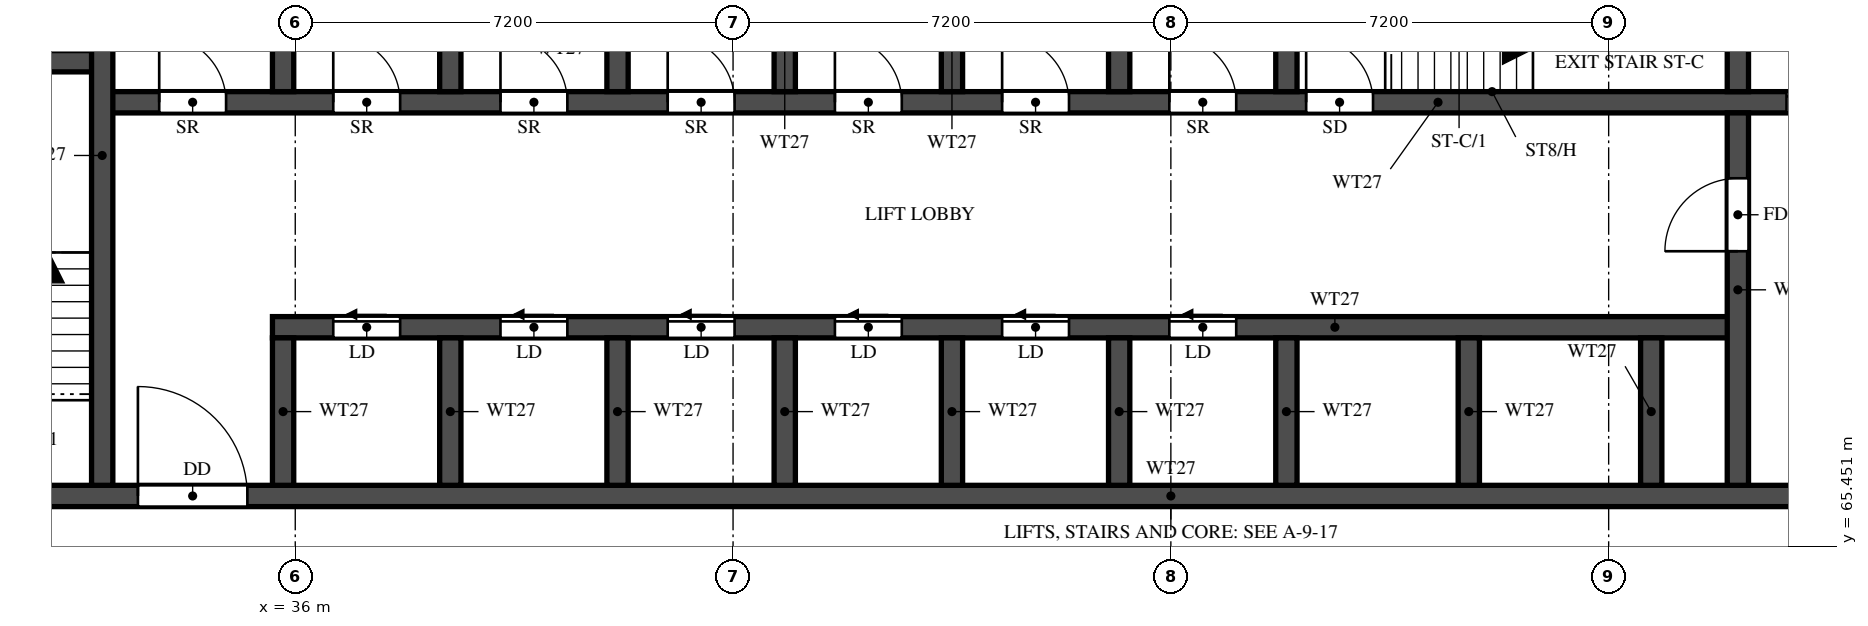
"""IFC4 building model, lengths in metres.
Left out: names, types, materials, properties, quantities, classifications, styles, units other than length and angle.
Written with IfcOpenShell. Run it as: python <this file> out.ifc"""

import sys

from ifc_helpers import new_model, si_unit, direction, frame, frame_2d, origin, place, context, subcontext, project, spatial, rectangle, extrude, element, fill, save


model = new_model("IFC4")
c1 = context("Model", 3, precision=1e-05, world=origin(), true_north=direction((0.0, 1.0)))
c2 = subcontext(c1, "Body", "Model", "MODEL_VIEW")
j1 = project(units=[si_unit("LENGTHUNIT", "METRE"), si_unit("PLANEANGLEUNIT", "RADIAN")], contexts=[c1])
p1 = place(None, origin())
s1 = spatial("IfcSite", under=j1, at=p1, CompositionType="ELEMENT")
p2 = place(p1, origin())
s2 = spatial("IfcBuilding", under=s1, at=p2, CompositionType="ELEMENT")
p3 = place(p2, frame((0.0, 0.0, 116.5)))
s3 = spatial("IfcBuildingStorey", under=s2, at=p3, CompositionType="ELEMENT", Elevation=116.5)
p4 = place(p3, frame((29.7, 66.275, 0.0), z_axis=(0.0, 0.0, 1.0), x_axis=(1.0, 0.0, 0.0)))
e1 = element("IfcWall", 1, at=p4, inside=s3, PredefinedType="SHEAR", context=c2, shape_type="SweptSolid", body=[
    extrude(rectangle(XDim=41.4, YDim=0.35, at=frame_2d((20.7, 0.0))), origin(), (0.0, 0.0, 1.0), 3.2),
])
p5 = place(p4, frame((0.925, 0.0, 0.0)))
e2 = element("IfcOpeningElement", 2, at=p5, cuts=e1, PredefinedType="OPENING", context=c2, shape_type="SweptSolid", body=[
    extrude(rectangle(XDim=1.1, YDim=2.1, at=frame_2d((0.55, 1.05))), frame((0.0, 0.185, 0.0), z_axis=(0.0, -1.0, 0.0), x_axis=(1.0, 0.0, 0.0)), (0.0, 0.0, 1.0), 0.37),
])
p6 = place(p4, frame((3.712, 0.0, 0.0)))
e3 = element("IfcOpeningElement", 3, at=p6, cuts=e1, PredefinedType="OPENING", context=c2, shape_type="SweptSolid", body=[
    extrude(rectangle(XDim=1.8, YDim=2.1, at=frame_2d((0.9, 1.05))), frame((0.0, 0.185, 0.0), z_axis=(0.0, -1.0, 0.0), x_axis=(1.0, 0.0, 0.0)), (0.0, 0.0, 1.0), 0.37),
])
p7 = place(p3, frame((35.625, 69.05, 0.0), z_axis=(0.0, 0.0, 1.0), x_axis=(1.0, 0.0, 0.0)))
e4 = element("IfcWall", 4, at=p7, inside=s3, PredefinedType="SHEAR", context=c2, shape_type="SweptSolid", body=[
    extrude(rectangle(XDim=24.1, YDim=0.35, at=frame_2d((12.05, 0.0))), origin(), (0.0, 0.0, 1.0), 3.2),
])
p8 = place(p7, frame((1.0, 0.0, 0.0)))
e5 = element("IfcOpeningElement", 5, at=p8, cuts=e4, PredefinedType="OPENING", context=c2, shape_type="SweptSolid", body=[
    extrude(rectangle(XDim=1.1, YDim=2.1, at=frame_2d((0.55, 1.05))), frame((0.0, 0.185, 0.0), z_axis=(0.0, -1.0, 0.0), x_axis=(1.0, 0.0, 0.0)), (0.0, 0.0, 1.0), 0.37),
])
p9 = place(p7, frame((3.75, 0.0, 0.0)))
e6 = element("IfcOpeningElement", 6, at=p9, cuts=e4, PredefinedType="OPENING", context=c2, shape_type="SweptSolid", body=[
    extrude(rectangle(XDim=1.1, YDim=2.1, at=frame_2d((0.55, 1.05))), frame((0.0, 0.185, 0.0), z_axis=(0.0, -1.0, 0.0), x_axis=(1.0, 0.0, 0.0)), (0.0, 0.0, 1.0), 0.37),
])
p10 = place(p7, frame((6.5, 0.0, 0.0)))
e7 = element("IfcOpeningElement", 7, at=p10, cuts=e4, PredefinedType="OPENING", context=c2, shape_type="SweptSolid", body=[
    extrude(rectangle(XDim=1.1, YDim=2.1, at=frame_2d((0.55, 1.05))), frame((0.0, 0.185, 0.0), z_axis=(0.0, -1.0, 0.0), x_axis=(1.0, 0.0, 0.0)), (0.0, 0.0, 1.0), 0.37),
])
p11 = place(p7, frame((9.25, 0.0, 0.0)))
e8 = element("IfcOpeningElement", 8, at=p11, cuts=e4, PredefinedType="OPENING", context=c2, shape_type="SweptSolid", body=[
    extrude(rectangle(XDim=1.1, YDim=2.1, at=frame_2d((0.55, 1.05))), frame((0.0, 0.185, 0.0), z_axis=(0.0, -1.0, 0.0), x_axis=(1.0, 0.0, 0.0)), (0.0, 0.0, 1.0), 0.37),
])
p12 = place(p7, frame((12.0, 0.0, 0.0)))
e9 = element("IfcOpeningElement", 9, at=p12, cuts=e4, PredefinedType="OPENING", context=c2, shape_type="SweptSolid", body=[
    extrude(rectangle(XDim=1.1, YDim=2.1, at=frame_2d((0.55, 1.05))), frame((0.0, 0.185, 0.0), z_axis=(0.0, -1.0, 0.0), x_axis=(1.0, 0.0, 0.0)), (0.0, 0.0, 1.0), 0.37),
])
p13 = place(p7, frame((14.75, 0.0, 0.0)))
e10 = element("IfcOpeningElement", 10, at=p13, cuts=e4, PredefinedType="OPENING", context=c2, shape_type="SweptSolid", body=[
    extrude(rectangle(XDim=1.1, YDim=2.1, at=frame_2d((0.55, 1.05))), frame((0.0, 0.185, 0.0), z_axis=(0.0, -1.0, 0.0), x_axis=(1.0, 0.0, 0.0)), (0.0, 0.0, 1.0), 0.37),
])
p14 = place(p3, frame((32.825, 72.75, 0.0), z_axis=(0.0, 0.0, 1.0), x_axis=(1.0, 0.0, 0.0)))
e11 = element("IfcWall", 11, at=p14, inside=s3, PredefinedType="SHEAR", context=c2, shape_type="SweptSolid", body=[
    extrude(rectangle(XDim=35.15, YDim=0.35, at=frame_2d((17.575, 0.0))), origin(), (0.0, 0.0, 1.0), 3.2),
])
p15 = place(p14, frame((19.8, 0.0, 0.0)))
e12 = element("IfcOpeningElement", 12, at=p15, cuts=e11, PredefinedType="OPENING", context=c2, shape_type="SweptSolid", body=[
    extrude(rectangle(XDim=1.1, YDim=2.1, at=frame_2d((0.55, 1.05))), frame((0.0, 0.185, 0.0), z_axis=(0.0, -1.0, 0.0), x_axis=(1.0, 0.0, 0.0)), (0.0, 0.0, 1.0), 0.37),
])
p16 = place(p14, frame((27.7, 0.0, 0.0)))
e13 = element("IfcOpeningElement", 13, at=p16, cuts=e11, PredefinedType="OPENING", context=c2, shape_type="SweptSolid", body=[
    extrude(rectangle(XDim=1.1, YDim=2.1, at=frame_2d((0.55, 1.05))), frame((0.0, 0.185, 0.0), z_axis=(0.0, -1.0, 0.0), x_axis=(1.0, 0.0, 0.0)), (0.0, 0.0, 1.0), 0.37),
])
p17 = place(p14, frame((30.3, 0.0, 0.0)))
e14 = element("IfcOpeningElement", 14, at=p17, cuts=e11, PredefinedType="OPENING", context=c2, shape_type="SweptSolid", body=[
    extrude(rectangle(XDim=1.1, YDim=2.1, at=frame_2d((0.55, 1.05))), frame((0.0, 0.185, 0.0), z_axis=(0.0, -1.0, 0.0), x_axis=(1.0, 0.0, 0.0)), (0.0, 0.0, 1.0), 0.37),
])
p18 = place(p14, frame((3.8, 0.0, 0.0)))
e15 = element("IfcOpeningElement", 15, at=p18, cuts=e11, PredefinedType="OPENING", context=c2, shape_type="SweptSolid", body=[
    extrude(rectangle(XDim=1.1, YDim=2.1, at=frame_2d((0.55, 1.05))), frame((0.0, 0.185, 0.0), z_axis=(0.0, -1.0, 0.0), x_axis=(1.0, 0.0, 0.0)), (0.0, 0.0, 1.0), 0.37),
])
p19 = place(p14, frame((6.55, 0.0, 0.0)))
e16 = element("IfcOpeningElement", 16, at=p19, cuts=e11, PredefinedType="OPENING", context=c2, shape_type="SweptSolid", body=[
    extrude(rectangle(XDim=1.1, YDim=2.1, at=frame_2d((0.55, 1.05))), frame((0.0, 0.185, 0.0), z_axis=(0.0, -1.0, 0.0), x_axis=(1.0, 0.0, 0.0)), (0.0, 0.0, 1.0), 0.37),
])
p20 = place(p14, frame((9.3, 0.0, 0.0)))
e17 = element("IfcOpeningElement", 17, at=p20, cuts=e11, PredefinedType="OPENING", context=c2, shape_type="SweptSolid", body=[
    extrude(rectangle(XDim=1.1, YDim=2.1, at=frame_2d((0.55, 1.05))), frame((0.0, 0.185, 0.0), z_axis=(0.0, -1.0, 0.0), x_axis=(1.0, 0.0, 0.0)), (0.0, 0.0, 1.0), 0.37),
])
p21 = place(p14, frame((12.05, 0.0, 0.0)))
e18 = element("IfcOpeningElement", 18, at=p21, cuts=e11, PredefinedType="OPENING", context=c2, shape_type="SweptSolid", body=[
    extrude(rectangle(XDim=1.1, YDim=2.1, at=frame_2d((0.55, 1.05))), frame((0.0, 0.185, 0.0), z_axis=(0.0, -1.0, 0.0), x_axis=(1.0, 0.0, 0.0)), (0.0, 0.0, 1.0), 0.37),
])
p22 = place(p14, frame((14.8, 0.0, 0.0)))
e19 = element("IfcOpeningElement", 19, at=p22, cuts=e11, PredefinedType="OPENING", context=c2, shape_type="SweptSolid", body=[
    extrude(rectangle(XDim=1.1, YDim=2.1, at=frame_2d((0.55, 1.05))), frame((0.0, 0.185, 0.0), z_axis=(0.0, -1.0, 0.0), x_axis=(1.0, 0.0, 0.0)), (0.0, 0.0, 1.0), 0.37),
])
p23 = place(p14, frame((17.55, 0.0, 0.0)))
e20 = element("IfcOpeningElement", 20, at=p23, cuts=e11, PredefinedType="OPENING", context=c2, shape_type="SweptSolid", body=[
    extrude(rectangle(XDim=1.1, YDim=2.1, at=frame_2d((0.55, 1.05))), frame((0.0, 0.185, 0.0), z_axis=(0.0, -1.0, 0.0), x_axis=(1.0, 0.0, 0.0)), (0.0, 0.0, 1.0), 0.37),
])
p24 = place(p14, frame((0.938, 0.0, 0.0)))
e21 = element("IfcOpeningElement", 21, at=p24, cuts=e11, PredefinedType="OPENING", context=c2, shape_type="SweptSolid", body=[
    extrude(rectangle(XDim=1.1, YDim=2.1, at=frame_2d((0.55, 1.05))), frame((0.0, 0.185, 0.0), z_axis=(0.0, -1.0, 0.0), x_axis=(1.0, 0.0, 0.0)), (0.0, 0.0, 1.0), 0.37),
])
p25 = place(p3, frame((29.7, 73.425, 0.0), z_axis=(0.0, 0.0, 1.0), x_axis=(1.0, 0.0, 0.0)))
e22 = element("IfcWall", 22, at=p25, inside=s3, PredefinedType="SHEAR", context=c2, shape_type="SweptSolid", body=[
    extrude(rectangle(XDim=3.125, YDim=0.35, at=frame_2d((1.562, 0.0))), origin(), (0.0, 0.0, 1.0), 3.2),
])
p26 = place(p3, frame((32.825, 66.45, 0.0), z_axis=(0.0, 0.0, 1.0), x_axis=(0.0, 1.0, 0.0)))
e23 = element("IfcWall", 23, at=p26, inside=s3, PredefinedType="SHEAR", context=c2, shape_type="SweptSolid", body=[
    extrude(rectangle(XDim=10.85, YDim=0.35, at=frame_2d((5.425, 0.0))), origin(), (0.0, 0.0, 1.0), 3.2),
])
p27 = place(p3, frame((59.725, 66.45, 0.0), z_axis=(0.0, 0.0, 1.0), x_axis=(0.0, 1.0, 0.0)))
e24 = element("IfcWall", 24, at=p27, inside=s3, PredefinedType="SHEAR", context=c2, shape_type="SweptSolid", body=[
    extrude(rectangle(XDim=6.125, YDim=0.35, at=frame_2d((3.062, 0.0))), origin(), (0.0, 0.0, 1.0), 3.2),
])
p28 = place(p27, frame((3.85, 0.0, 0.0)))
e25 = element("IfcOpeningElement", 25, at=p28, cuts=e24, PredefinedType="OPENING", context=c2, shape_type="SweptSolid", body=[
    extrude(rectangle(XDim=1.2, YDim=2.1, at=frame_2d((0.6, 1.05))), frame((0.0, 0.185, 0.0), z_axis=(0.0, -1.0, 0.0), x_axis=(1.0, 0.0, 0.0)), (0.0, 0.0, 1.0), 0.37),
])
p29 = place(p3, frame((59.725, 72.925, 0.0), z_axis=(0.0, 0.0, 1.0), x_axis=(0.0, 1.0, 0.0)))
e26 = element("IfcWall", 26, at=p29, inside=s3, PredefinedType="SHEAR", context=c2, shape_type="SweptSolid", body=[
    extrude(rectangle(XDim=2.95, YDim=0.35, at=frame_2d((1.475, 0.0))), origin(), (0.0, 0.0, 1.0), 3.2),
])
for number, where, z_axis, x_axis in (
    (27, (35.8, 66.45, 0.0), (0.0, 0.0, 1.0), (0.0, 1.0, 0.0)),
    (28, (38.55, 66.45, 0.0), (0.0, 0.0, 1.0), (0.0, 1.0, 0.0)),
    (29, (41.3, 66.45, 0.0), (0.0, 0.0, 1.0), (0.0, 1.0, 0.0)),
    (30, (44.05, 66.45, 0.0), (0.0, 0.0, 1.0), (0.0, 1.0, 0.0)),
    (31, (46.8, 66.45, 0.0), (0.0, 0.0, 1.0), (0.0, 1.0, 0.0)),
    (32, (49.55, 66.45, 0.0), (0.0, 0.0, 1.0), (0.0, 1.0, 0.0)),
    (33, (52.3, 66.45, 0.0), (0.0, 0.0, 1.0), (0.0, 1.0, 0.0)),
    (34, (55.3, 66.45, 0.0), (0.0, 0.0, 1.0), (0.0, 1.0, 0.0)),
    (35, (58.3, 66.45, 0.0), (0.0, 0.0, 1.0), (0.0, 1.0, 0.0)),
):
    element("IfcWall", number, at=place(p3, frame(where, z_axis=z_axis, x_axis=x_axis)), inside=s3, PredefinedType="SHEAR", context=c2, shape_type="SweptSolid", body=[
        extrude(rectangle(XDim=2.425, YDim=0.35, at=frame_2d((1.212, 0.0))), origin(), (0.0, 0.0, 1.0), 3.2),
    ])
for number, where, z_axis, x_axis in (
    (36, (35.8, 72.925, 0.0), (0.0, 0.0, 1.0), (0.0, 1.0, 0.0)),
    (37, (38.55, 72.925, 0.0), (0.0, 0.0, 1.0), (0.0, 1.0, 0.0)),
    (38, (41.3, 72.925, 0.0), (0.0, 0.0, 1.0), (0.0, 1.0, 0.0)),
    (39, (44.05, 72.925, 0.0), (0.0, 0.0, 1.0), (0.0, 1.0, 0.0)),
    (40, (46.8, 72.925, 0.0), (0.0, 0.0, 1.0), (0.0, 1.0, 0.0)),
    (41, (49.55, 72.925, 0.0), (0.0, 0.0, 1.0), (0.0, 1.0, 0.0)),
    (42, (52.3, 72.925, 0.0), (0.0, 0.0, 1.0), (0.0, 1.0, 0.0)),
):
    element("IfcWall", number, at=place(p3, frame(where, z_axis=z_axis, x_axis=x_axis)), inside=s3, PredefinedType="SHEAR", context=c2, shape_type="SweptSolid", body=[
        extrude(rectangle(XDim=2.95, YDim=0.35, at=frame_2d((1.475, 0.0))), origin(), (0.0, 0.0, 1.0), 3.2),
    ])
p30 = place(p15, origin())
e43 = element("IfcDoor", 43, at=p30, inside=s3, OperationType="SINGLE_SWING_LEFT", PredefinedType="DOOR", context=c2, shape_type="SweptSolid", body=[
    extrude(rectangle(XDim=1.1, YDim=2.1, at=frame_2d((0.55, 1.05))), frame((0.0, 0.025, 0.0), z_axis=(0.0, -1.0, 0.0), x_axis=(1.0, 0.0, 0.0)), (0.0, 0.0, 1.0), 0.05),
])
fill(e12, e43)
p31 = place(p6, origin())
e44 = element("IfcDoor", 44, at=p31, inside=s3, OperationType="DOUBLE_DOOR_SINGLE_SWING", PredefinedType="DOOR", context=c2, shape_type="SweptSolid", body=[
    extrude(rectangle(XDim=1.8, YDim=2.1, at=frame_2d((0.9, 1.05))), frame((0.0, 0.025, 0.0), z_axis=(0.0, -1.0, 0.0), x_axis=(1.0, 0.0, 0.0)), (0.0, 0.0, 1.0), 0.05),
])
fill(e3, e44)
p32 = place(p28, origin())
e45 = element("IfcDoor", 45, at=p32, inside=s3, OperationType="SINGLE_SWING_LEFT", PredefinedType="DOOR", context=c2, shape_type="SweptSolid", body=[
    extrude(rectangle(XDim=1.2, YDim=2.1, at=frame_2d((0.6, 1.05))), frame((0.0, 0.025, 0.0), z_axis=(0.0, -1.0, 0.0), x_axis=(1.0, 0.0, 0.0)), (0.0, 0.0, 1.0), 0.05),
])
fill(e25, e45)
p33 = place(p16, origin())
e46 = element("IfcDoor", 46, at=p33, inside=s3, OperationType="SLIDING_TO_LEFT", PredefinedType="DOOR", context=c2, shape_type="SweptSolid", body=[
    extrude(rectangle(XDim=1.1, YDim=2.1, at=frame_2d((0.55, 1.05))), frame((0.0, 0.025, 0.0), z_axis=(0.0, -1.0, 0.0), x_axis=(1.0, 0.0, 0.0)), (0.0, 0.0, 1.0), 0.05),
])
fill(e13, e46)
p34 = place(p8, origin())
e47 = element("IfcDoor", 47, at=p34, inside=s3, OperationType="SLIDING_TO_LEFT", PredefinedType="DOOR", context=c2, shape_type="SweptSolid", body=[
    extrude(rectangle(XDim=1.1, YDim=2.1, at=frame_2d((0.55, 1.05))), frame((0.0, 0.025, 0.0), z_axis=(0.0, -1.0, 0.0), x_axis=(1.0, 0.0, 0.0)), (0.0, 0.0, 1.0), 0.05),
])
fill(e5, e47)
p35 = place(p9, origin())
e48 = element("IfcDoor", 48, at=p35, inside=s3, OperationType="SLIDING_TO_LEFT", PredefinedType="DOOR", context=c2, shape_type="SweptSolid", body=[
    extrude(rectangle(XDim=1.1, YDim=2.1, at=frame_2d((0.55, 1.05))), frame((0.0, 0.025, 0.0), z_axis=(0.0, -1.0, 0.0), x_axis=(1.0, 0.0, 0.0)), (0.0, 0.0, 1.0), 0.05),
])
fill(e6, e48)
p36 = place(p10, origin())
e49 = element("IfcDoor", 49, at=p36, inside=s3, OperationType="SLIDING_TO_LEFT", PredefinedType="DOOR", context=c2, shape_type="SweptSolid", body=[
    extrude(rectangle(XDim=1.1, YDim=2.1, at=frame_2d((0.55, 1.05))), frame((0.0, 0.025, 0.0), z_axis=(0.0, -1.0, 0.0), x_axis=(1.0, 0.0, 0.0)), (0.0, 0.0, 1.0), 0.05),
])
fill(e7, e49)
p37 = place(p11, origin())
e50 = element("IfcDoor", 50, at=p37, inside=s3, OperationType="SLIDING_TO_LEFT", PredefinedType="DOOR", context=c2, shape_type="SweptSolid", body=[
    extrude(rectangle(XDim=1.1, YDim=2.1, at=frame_2d((0.55, 1.05))), frame((0.0, 0.025, 0.0), z_axis=(0.0, -1.0, 0.0), x_axis=(1.0, 0.0, 0.0)), (0.0, 0.0, 1.0), 0.05),
])
fill(e8, e50)
p38 = place(p12, origin())
e51 = element("IfcDoor", 51, at=p38, inside=s3, OperationType="SLIDING_TO_LEFT", PredefinedType="DOOR", context=c2, shape_type="SweptSolid", body=[
    extrude(rectangle(XDim=1.1, YDim=2.1, at=frame_2d((0.55, 1.05))), frame((0.0, 0.025, 0.0), z_axis=(0.0, -1.0, 0.0), x_axis=(1.0, 0.0, 0.0)), (0.0, 0.0, 1.0), 0.05),
])
fill(e9, e51)
p39 = place(p13, origin())
e52 = element("IfcDoor", 52, at=p39, inside=s3, OperationType="SLIDING_TO_LEFT", PredefinedType="DOOR", context=c2, shape_type="SweptSolid", body=[
    extrude(rectangle(XDim=1.1, YDim=2.1, at=frame_2d((0.55, 1.05))), frame((0.0, 0.025, 0.0), z_axis=(0.0, -1.0, 0.0), x_axis=(1.0, 0.0, 0.0)), (0.0, 0.0, 1.0), 0.05),
])
fill(e10, e52)
p40 = place(p18, origin())
e53 = element("IfcDoor", 53, at=p40, inside=s3, OperationType="SINGLE_SWING_LEFT", PredefinedType="DOOR", context=c2, shape_type="SweptSolid", body=[
    extrude(rectangle(XDim=1.1, YDim=2.1, at=frame_2d((0.55, 1.05))), frame((0.0, 0.025, 0.0), z_axis=(0.0, -1.0, 0.0), x_axis=(1.0, 0.0, 0.0)), (0.0, 0.0, 1.0), 0.05),
])
fill(e15, e53)
p41 = place(p19, origin())
e54 = element("IfcDoor", 54, at=p41, inside=s3, OperationType="SINGLE_SWING_RIGHT", PredefinedType="DOOR", context=c2, shape_type="SweptSolid", body=[
    extrude(rectangle(XDim=1.1, YDim=2.1, at=frame_2d((0.55, 1.05))), frame((0.0, 0.025, 0.0), z_axis=(0.0, -1.0, 0.0), x_axis=(1.0, 0.0, 0.0)), (0.0, 0.0, 1.0), 0.05),
])
fill(e16, e54)
p42 = place(p20, origin())
e55 = element("IfcDoor", 55, at=p42, inside=s3, OperationType="SINGLE_SWING_LEFT", PredefinedType="DOOR", context=c2, shape_type="SweptSolid", body=[
    extrude(rectangle(XDim=1.1, YDim=2.1, at=frame_2d((0.55, 1.05))), frame((0.0, 0.025, 0.0), z_axis=(0.0, -1.0, 0.0), x_axis=(1.0, 0.0, 0.0)), (0.0, 0.0, 1.0), 0.05),
])
fill(e17, e55)
p43 = place(p21, origin())
e56 = element("IfcDoor", 56, at=p43, inside=s3, OperationType="SINGLE_SWING_RIGHT", PredefinedType="DOOR", context=c2, shape_type="SweptSolid", body=[
    extrude(rectangle(XDim=1.1, YDim=2.1, at=frame_2d((0.55, 1.05))), frame((0.0, 0.025, 0.0), z_axis=(0.0, -1.0, 0.0), x_axis=(1.0, 0.0, 0.0)), (0.0, 0.0, 1.0), 0.05),
])
fill(e18, e56)
p44 = place(p22, origin())
e57 = element("IfcDoor", 57, at=p44, inside=s3, OperationType="SINGLE_SWING_LEFT", PredefinedType="DOOR", context=c2, shape_type="SweptSolid", body=[
    extrude(rectangle(XDim=1.1, YDim=2.1, at=frame_2d((0.55, 1.05))), frame((0.0, 0.025, 0.0), z_axis=(0.0, -1.0, 0.0), x_axis=(1.0, 0.0, 0.0)), (0.0, 0.0, 1.0), 0.05),
])
fill(e19, e57)
p45 = place(p23, origin())
e58 = element("IfcDoor", 58, at=p45, inside=s3, OperationType="SINGLE_SWING_RIGHT", PredefinedType="DOOR", context=c2, shape_type="SweptSolid", body=[
    extrude(rectangle(XDim=1.1, YDim=2.1, at=frame_2d((0.55, 1.05))), frame((0.0, 0.025, 0.0), z_axis=(0.0, -1.0, 0.0), x_axis=(1.0, 0.0, 0.0)), (0.0, 0.0, 1.0), 0.05),
])
fill(e20, e58)
p46 = place(p24, origin())
e59 = element("IfcDoor", 59, at=p46, inside=s3, OperationType="SINGLE_SWING_LEFT", PredefinedType="DOOR", context=c2, shape_type="SweptSolid", body=[
    extrude(rectangle(XDim=1.1, YDim=2.1, at=frame_2d((0.55, 1.05))), frame((0.0, 0.025, 0.0), z_axis=(0.0, -1.0, 0.0), x_axis=(1.0, 0.0, 0.0)), (0.0, 0.0, 1.0), 0.05),
])
fill(e21, e59)
save(model, sys.argv[1])
